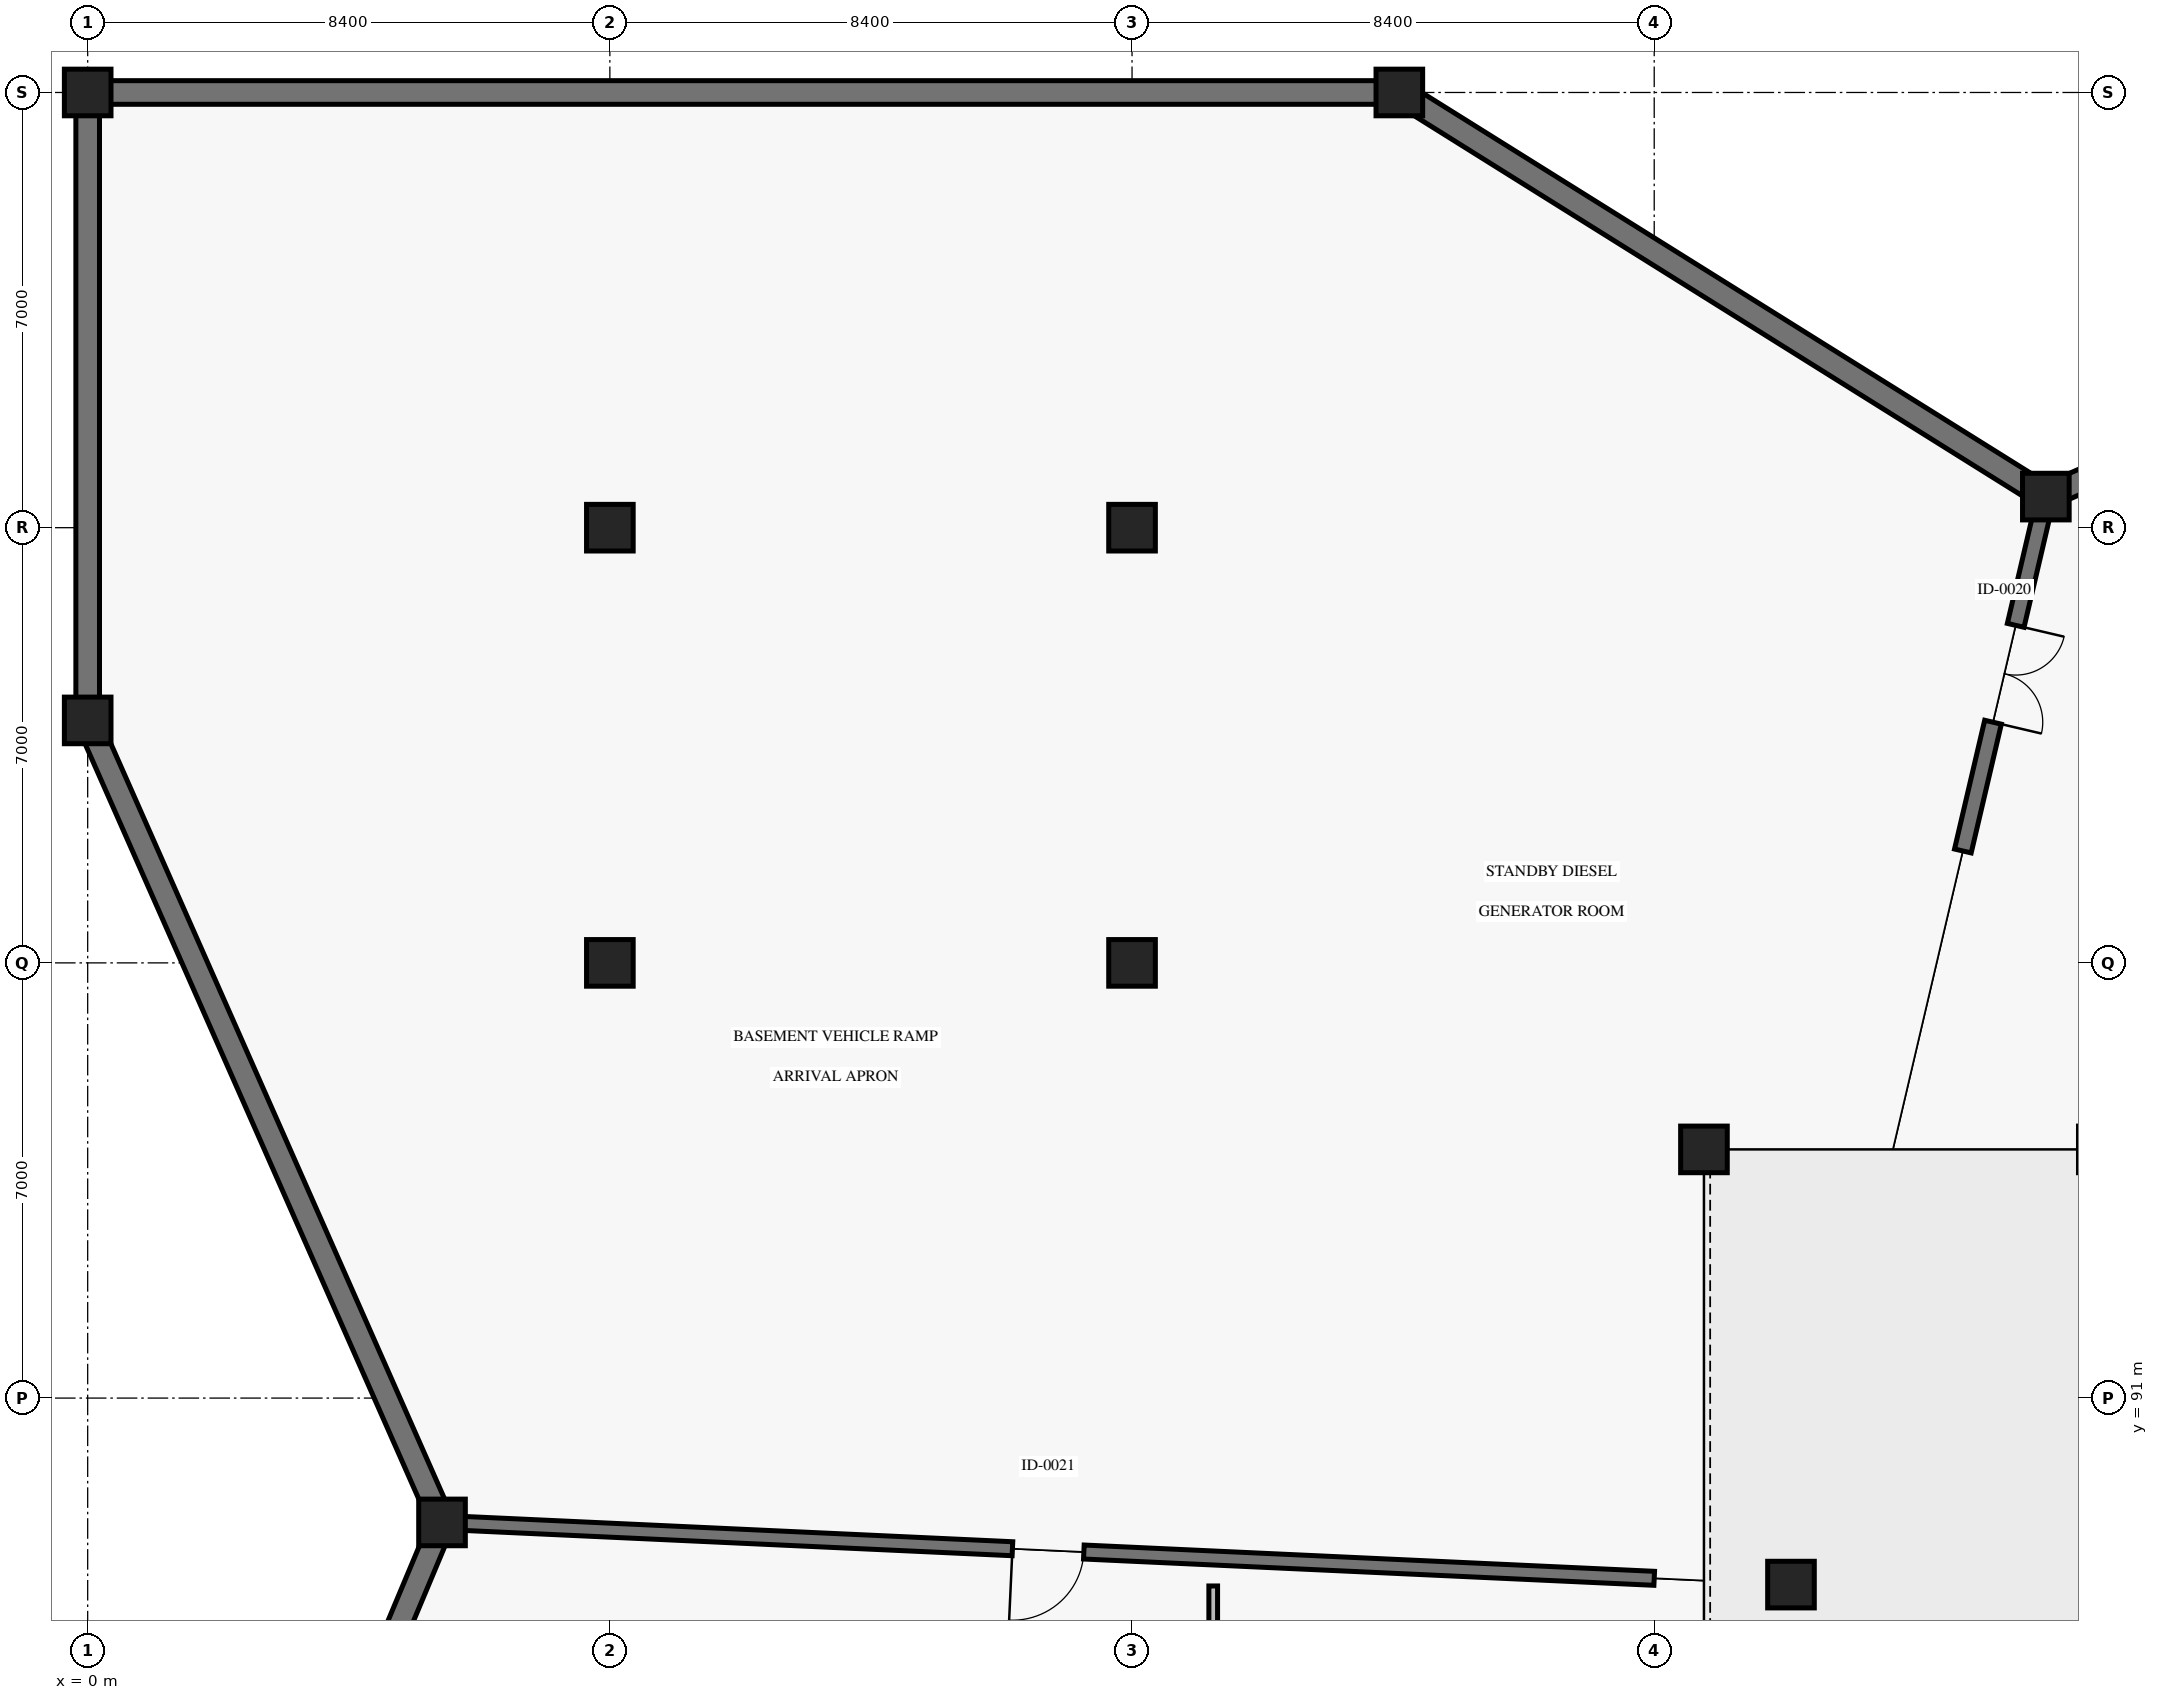
"""IFC4 building model, lengths in metres.
Left out: names, types, materials, properties, quantities, classifications, styles, units other than length and angle.
Written with IfcOpenShell. Run it as: python <this file> out.ifc"""

import sys

from ifc_helpers import new_model, si_unit, direction, frame, frame_2d, origin, origin_2d, place, context, subcontext, project, spatial, rectangle, extrude, element, fill, save


model = new_model("IFC4")
c1 = context("Model", 3, precision=1e-05, world=origin(), true_north=direction((0.0, 1.0)))
c2 = subcontext(c1, "Body", "Model", "MODEL_VIEW")
j1 = project(units=[si_unit("LENGTHUNIT", "METRE"), si_unit("PLANEANGLEUNIT", "RADIAN")], contexts=[c1])
p1 = place(None, origin())
s1 = spatial("IfcSite", under=j1, at=p1, CompositionType="ELEMENT")
p2 = place(p1, origin())
s2 = spatial("IfcBuilding", under=s1, at=p2, CompositionType="ELEMENT")
p3 = place(p2, frame((0.0, 0.0, -4.5)))
s3 = spatial("IfcBuildingStorey", under=s2, at=p3, CompositionType="ELEMENT", Elevation=-4.5)
for number, where, z_axis, x_axis in (
    (1, (0.0, 101.9, 0.0), (0.0, 0.0, 1.0), (1.0, 0.0, 0.0)),
    (2, (0.0, 112.0, 0.0), (0.0, 0.0, 1.0), (1.0, 0.0, 0.0)),
    (3, (5.7, 89.0, 0.0), (0.0, 0.0, 1.0), (1.0, 0.0, 0.0)),
    (4, (21.1, 112.0, 0.0), (0.0, 0.0, 1.0), (1.0, 0.0, 0.0)),
    (5, (27.4, 88.0, 0.0), (0.0, 0.0, 1.0), (1.0, 0.0, 0.0)),
    (6, (31.5, 105.5, 0.0), (0.0, 0.0, 1.0), (1.0, 0.0, 0.0)),
    (7, (8.4, 98.0, 0.0), (0.0, 0.0, 1.0), (1.0, 0.0, 0.0)),
    (8, (8.4, 105.0, 0.0), (0.0, 0.0, 1.0), (1.0, 0.0, 0.0)),
    (9, (16.8, 98.0, 0.0), (0.0, 0.0, 1.0), (1.0, 0.0, 0.0)),
    (10, (16.8, 105.0, 0.0), (0.0, 0.0, 1.0), (1.0, 0.0, 0.0)),
    (11, (26.0, 95.0, 0.0), (0.0, 0.0, 1.0), (1.0, 0.0, 0.0)),
):
    element("IfcColumn", number, at=place(p3, frame(where, z_axis=z_axis, x_axis=x_axis)), inside=s3, PredefinedType="COLUMN", context=c2, shape_type="SweptSolid", body=[
        extrude(rectangle(XDim=0.75, YDim=0.75, at=origin_2d()), origin(), (0.0, 0.0, 1.0), 4.5),
    ])
p4 = place(p3, frame((42.2, 110.2, 0.0), z_axis=(0.0, 0.0, 1.0), x_axis=(-0.915563585263, -0.402173247918, 0.0)))
e12 = element("IfcWall", 12, at=p4, inside=s3, PredefinedType="USERDEFINED", context=c2, shape_type="SweptSolid", body=[
    extrude(rectangle(XDim=11.637, YDim=0.38, at=frame_2d((5.818, 0.0))), origin(), (0.0, 0.0, 1.0), 4.14),
])
p5 = place(p3, frame((5.681, 88.954, 0.0), z_axis=(0.0, 0.0, 1.0), x_axis=(-0.386546655602, -0.922269853699, 0.0)))
e13 = element("IfcWall", 13, at=p5, inside=s3, PredefinedType="USERDEFINED", context=c2, shape_type="SweptSolid", body=[
    extrude(rectangle(XDim=14.697, YDim=0.38, at=frame_2d((7.348, 0.0))), origin(), (0.0, 0.0, 1.0), 4.14),
])
p6 = place(p3, frame((31.458, 105.526, 0.0), z_axis=(0.0, 0.0, 1.0), x_axis=(-0.847982583258, 0.530024092369, 0.0)))
e14 = element("IfcWall", 14, at=p6, inside=s3, PredefinedType="USERDEFINED", context=c2, shape_type="SweptSolid", body=[
    extrude(rectangle(XDim=12.215, YDim=0.38, at=frame_2d((6.107, 0.0))), origin(), (0.0, 0.0, 1.0), 4.14),
])
p7 = place(p3, frame((21.1, 112.0, 0.0), z_axis=(0.0, 0.0, 1.0), x_axis=(-1.0, 0.0, 0.0)))
e15 = element("IfcWall", 15, at=p7, inside=s3, PredefinedType="USERDEFINED", context=c2, shape_type="SweptSolid", body=[
    extrude(rectangle(XDim=21.1, YDim=0.38, at=frame_2d((10.55, 0.0))), origin(), (0.0, 0.0, 1.0), 4.14),
])
p8 = place(p3, frame((0.0, 112.0, 0.0), z_axis=(0.0, 0.0, 1.0), x_axis=(0.0, -1.0, 0.0)))
e16 = element("IfcWall", 16, at=p8, inside=s3, PredefinedType="USERDEFINED", context=c2, shape_type="SweptSolid", body=[
    extrude(rectangle(XDim=10.1, YDim=0.38, at=frame_2d((5.05, 0.0))), origin(), (0.0, 0.0, 1.0), 4.14),
])
p9 = place(p3, frame((0.0, 101.9, 0.0), z_axis=(0.0, 0.0, 1.0), x_axis=(0.404179059324, -0.914679882803, 0.0)))
e17 = element("IfcWall", 17, at=p9, inside=s3, PredefinedType="USERDEFINED", context=c2, shape_type="SweptSolid", body=[
    extrude(rectangle(XDim=14.053, YDim=0.38, at=frame_2d((7.026, 0.0))), origin(), (0.0, 0.0, 1.0), 4.14),
])
p10 = place(p3, frame((31.5, 105.5, 0.0), z_axis=(0.0, 0.0, 1.0), x_axis=(-0.228035044918, -0.973652924963, 0.0)))
e18 = element("IfcWall", 18, at=p10, inside=s3, PredefinedType="SOLIDWALL", context=c2, shape_type="SweptSolid", body=[
    extrude(rectangle(XDim=5.854, YDim=0.275, at=frame_2d((2.927, 0.0))), origin(), (0.0, 0.0, 1.0), 4.14),
])
p11 = place(p10, frame((2.127, 0.0, 0.0)))
e19 = element("IfcOpeningElement", 19, at=p11, cuts=e18, PredefinedType="OPENING", context=c2, shape_type="SweptSolid", body=[
    extrude(rectangle(XDim=1.6, YDim=2.45, at=frame_2d((0.8, 1.225))), frame((0.0, 0.147, 0.0), z_axis=(0.0, -1.0, 0.0), x_axis=(1.0, 0.0, 0.0)), (0.0, 0.0, 1.0), 0.295),
])
p12 = place(p3, frame((25.2, 88.101, 0.0), z_axis=(0.0, 0.0, 1.0), x_axis=(-0.998939142773, 0.046049853812, 0.0)))
e20 = element("IfcWall", 20, at=p12, inside=s3, PredefinedType="SOLIDWALL", context=c2, shape_type="SweptSolid", body=[
    extrude(rectangle(XDim=19.521, YDim=0.225, at=frame_2d((9.76, 0.0))), origin(), (0.0, 0.0, 1.0), 4.14),
])
p13 = place(p12, frame((9.185, 0.0, 0.0)))
e21 = element("IfcOpeningElement", 21, at=p13, cuts=e20, PredefinedType="OPENING", context=c2, shape_type="SweptSolid", body=[
    extrude(rectangle(XDim=1.15, YDim=2.2, at=frame_2d((0.575, 1.1))), frame((0.0, 0.123, 0.0), z_axis=(0.0, -1.0, 0.0), x_axis=(1.0, 0.0, 0.0)), (0.0, 0.0, 1.0), 0.245),
])
p14 = place(p3, frame((18.106, 81.6, 0.0), z_axis=(0.0, 0.0, 1.0), x_axis=(0.0, 1.0, 0.0)))
e22 = element("IfcWall", 22, at=p14, inside=s3, PredefinedType="PARTITIONING", context=c2, shape_type="SweptSolid", body=[
    extrude(rectangle(XDim=6.378, YDim=0.14, at=frame_2d((3.189, 0.0))), origin(), (0.0, 0.0, 1.0), 3.02),
])
p15 = place(p14, frame((3.509, 0.0, 0.0)))
e23 = element("IfcOpeningElement", 23, at=p15, cuts=e22, PredefinedType="OPENING", context=c2, shape_type="SweptSolid", body=[
    extrude(rectangle(XDim=0.98, YDim=2.15, at=frame_2d((0.49, 1.075))), frame((0.0, 0.08, 0.0), z_axis=(0.0, -1.0, 0.0), x_axis=(1.0, 0.0, 0.0)), (0.0, 0.0, 1.0), 0.16),
])
p16 = place(p11, origin())
e24 = element("IfcDoor", 24, at=p16, inside=s3, OperationType="DOUBLE_DOOR_SINGLE_SWING", PredefinedType="DOOR", context=c2, shape_type="SweptSolid", body=[
    extrude(rectangle(XDim=1.6, YDim=2.45, at=frame_2d((0.8, 1.225))), frame((0.0, 0.025, 0.0), z_axis=(0.0, -1.0, 0.0), x_axis=(1.0, 0.0, 0.0)), (0.0, 0.0, 1.0), 0.05),
])
fill(e19, e24)
p17 = place(p13, origin())
e25 = element("IfcDoor", 25, at=p17, inside=s3, OperationType="SINGLE_SWING_RIGHT", PredefinedType="DOOR", context=c2, shape_type="SweptSolid", body=[
    extrude(rectangle(XDim=1.15, YDim=2.2, at=frame_2d((0.575, 1.1))), frame((0.0, 0.025, 0.0), z_axis=(0.0, -1.0, 0.0), x_axis=(1.0, 0.0, 0.0)), (0.0, 0.0, 1.0), 0.05),
])
fill(e21, e25)
save(model, sys.argv[1])
